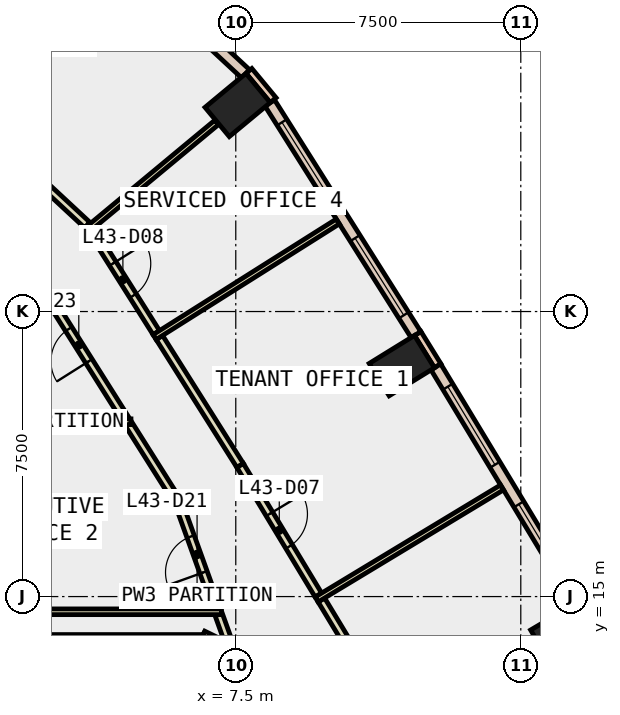
"""IFC4 building model, lengths in metres.
Left out: names, types, materials, properties, quantities, classifications, styles, units other than length and angle.
Written with IfcOpenShell. Run it as: python <this file> out.ifc"""

import sys

from ifc_helpers import new_model, si_unit, direction, frame, frame_2d, origin, origin_2d, place, context, subcontext, project, spatial, polyline, rectangle, outline, extrude, element, fill, save


model = new_model("IFC4")
c1 = context("Model", 3, precision=1e-05, world=origin(), true_north=direction((0.0, 1.0)))
c2 = subcontext(c1, "Body", "Model", "MODEL_VIEW")
j1 = project(units=[si_unit("LENGTHUNIT", "METRE"), si_unit("PLANEANGLEUNIT", "RADIAN")], contexts=[c1])
p1 = place(None, origin())
s1 = spatial("IfcSite", under=j1, at=p1, CompositionType="ELEMENT")
p2 = place(p1, origin())
s2 = spatial("IfcBuilding", under=s1, at=p2, CompositionType="ELEMENT")
p3 = place(p2, frame((0.0, 0.0, 194.0)))
s3 = spatial("IfcBuildingStorey", under=s2, at=p3, CompositionType="ELEMENT", Elevation=194.0)
for number, where, z_axis, x_axis in (
    (1, (16.116, 14.046, -0.4), (0.0, 0.0, 1.0), (-0.509, 0.861, 0.0)),
    (2, (11.869, 21.076, -0.4), (0.0, 0.0, 1.0), (-0.525, 0.851, 0.0)),
    (3, (7.549, 27.935, -0.4), (0.0, 0.0, 1.0), (-0.639, 0.769, 0.0)),
):
    element("IfcColumn", number, at=place(p3, frame(where, z_axis=z_axis, x_axis=x_axis)), inside=s3, PredefinedType="COLUMN", context=c2, shape_type="SweptSolid", body=[
        extrude(rectangle(XDim=1.0, YDim=1.4, at=origin_2d()), origin(), (0.0, 0.0, 1.0), 4.2),
    ])
p4 = place(p3, frame((0.0, 0.0, -0.4)))
e4 = element("IfcWall", 4, at=p4, inside=s3, PredefinedType="SHEAR", context=c2, shape_type="SweptSolid", body=[
    extrude(outline(polyline([(6.478, 12.88), (7.084, 13.23), (6.64, 14.0), (6.235, 13.3), (6.478, 12.88)])), origin(), (0.0, 0.0, 1.0), 4.2),
])
p5 = place(p3, frame((0.0, 0.0, -0.4)))
e5 = element("IfcWall", 5, at=p5, inside=s3, PredefinedType="SHEAR", context=c2, shape_type="SweptSolid", body=[
    extrude(outline(polyline([(6.64, 14.0), (-6.64, 14.0), (-6.235, 13.3), (6.235, 13.3), (6.64, 14.0)])), origin(), (0.0, 0.0, 1.0), 4.2),
])
p6 = place(p3, frame((12.813, 21.071, 0.0), z_axis=(0.0, 0.0, 1.0), x_axis=(-0.525648735675, 0.850701714282, 0.0)))
e6 = element("IfcWall", 6, at=p6, inside=s3, PredefinedType="STANDARD", context=c2, shape_type="SweptSolid", body=[
    extrude(rectangle(XDim=1.0, YDim=0.2, at=frame_2d((0.5, 0.0))), origin(), (0.0, 0.0, 1.0), 3.8),
])
p7 = place(p3, frame((8.484, 28.061, 0.0), z_axis=(0.0, 0.0, 1.0), x_axis=(-0.637972365578, 0.770059257953, 0.0)))
e7 = element("IfcWall", 7, at=p7, inside=s3, PredefinedType="STANDARD", context=c2, shape_type="SweptSolid", body=[
    extrude(rectangle(XDim=1.0, YDim=0.2, at=frame_2d((0.5, 0.0))), origin(), (0.0, 0.0, 1.0), 3.8),
])
p8 = place(p3, frame((16.504, 14.855, 0.0), z_axis=(0.0, 0.0, 1.0), x_axis=(-0.517159962006, 0.855888762456, 0.0)))
e8 = element("IfcWall", 8, at=p8, inside=s3, PredefinedType="STANDARD", context=c2, shape_type="SweptSolid", body=[
    extrude(rectangle(XDim=7.23, YDim=0.3, at=frame_2d((3.615, 0.0))), origin(), (0.0, 0.0, 1.0), 3.8),
])
p9 = place(p8, frame((0.607, 0.0, 0.9)))
e9 = element("IfcOpeningElement", 9, at=p9, cuts=e8, PredefinedType="OPENING", context=c2, shape_type="SweptSolid", body=[
    extrude(rectangle(XDim=2.4, YDim=2.6, at=frame_2d((1.2, 1.3))), frame((0.0, 0.16, 0.0), z_axis=(0.0, -1.0, 0.0), x_axis=(1.0, 0.0, 0.0)), (0.0, 0.0, 1.0), 0.32),
])
p10 = place(p8, frame((4.222, 0.0, 0.9)))
e10 = element("IfcOpeningElement", 10, at=p10, cuts=e8, PredefinedType="OPENING", context=c2, shape_type="SweptSolid", body=[
    extrude(rectangle(XDim=2.4, YDim=2.6, at=frame_2d((1.2, 1.3))), frame((0.0, 0.16, 0.0), z_axis=(0.0, -1.0, 0.0), x_axis=(1.0, 0.0, 0.0)), (0.0, 0.0, 1.0), 0.32),
])
p11 = place(p3, frame((12.241, 21.892, 0.0), z_axis=(0.0, 0.0, 1.0), x_axis=(-0.533680752529, 0.845686025887, 0.0)))
e11 = element("IfcWall", 11, at=p11, inside=s3, PredefinedType="STANDARD", context=c2, shape_type="SweptSolid", body=[
    extrude(rectangle(XDim=7.208, YDim=0.3, at=frame_2d((3.604, 0.0))), origin(), (0.0, 0.0, 1.0), 3.8),
])
p12 = place(p11, frame((0.602, 0.0, 0.9)))
e12 = element("IfcOpeningElement", 12, at=p12, cuts=e11, PredefinedType="OPENING", context=c2, shape_type="SweptSolid", body=[
    extrude(rectangle(XDim=2.4, YDim=2.6, at=frame_2d((1.2, 1.3))), frame((0.0, 0.16, 0.0), z_axis=(0.0, -1.0, 0.0), x_axis=(1.0, 0.0, 0.0)), (0.0, 0.0, 1.0), 0.32),
])
p13 = place(p11, frame((4.206, 0.0, 0.9)))
e13 = element("IfcOpeningElement", 13, at=p13, cuts=e11, PredefinedType="OPENING", context=c2, shape_type="SweptSolid", body=[
    extrude(rectangle(XDim=2.4, YDim=2.6, at=frame_2d((1.2, 1.3))), frame((0.0, 0.16, 0.0), z_axis=(0.0, -1.0, 0.0), x_axis=(1.0, 0.0, 0.0)), (0.0, 0.0, 1.0), 0.32),
])
p14 = place(p3, frame((7.757, 28.756, 0.0), z_axis=(0.0, 0.0, 1.0), x_axis=(-0.732897351132, 0.680339233547, 0.0)))
e14 = element("IfcWall", 14, at=p14, inside=s3, PredefinedType="STANDARD", context=c2, shape_type="SweptSolid", body=[
    extrude(rectangle(XDim=3.767, YDim=0.3, at=frame_2d((1.884, 0.0))), origin(), (0.0, 0.0, 1.0), 3.8),
])
p15 = place(p14, frame((1.184, 0.0, 0.9)))
e15 = element("IfcOpeningElement", 15, at=p15, cuts=e14, PredefinedType="OPENING", context=c2, shape_type="SweptSolid", body=[
    extrude(rectangle(XDim=1.4, YDim=2.6, at=frame_2d((0.7, 1.3))), frame((0.0, 0.16, 0.0), z_axis=(0.0, -1.0, 0.0), x_axis=(1.0, 0.0, 0.0)), (0.0, 0.0, 1.0), 0.32),
])
p16 = place(p3, frame((6.64, 14.0, 0.0), z_axis=(0.0, 0.0, 1.0), x_axis=(0.899046412443, -0.437853341055, 0.0)))
e16 = element("IfcWall", 16, at=p16, inside=s3, PredefinedType="PARTITIONING", context=c2, shape_type="SweptSolid", body=[
    extrude(rectangle(XDim=0.523, YDim=0.2, at=frame_2d((0.261, 0.0))), origin(), (0.0, 0.0, 1.0), 3.8),
])
p17 = place(p3, frame((7.401, 13.552, 0.0), z_axis=(0.0, 0.0, 1.0), x_axis=(-0.337944878606, 0.941165904091, 0.0)))
e17 = element("IfcWall", 17, at=p17, inside=s3, PredefinedType="PARTITIONING", context=c2, shape_type="SweptSolid", body=[
    extrude(rectangle(XDim=1.038, YDim=0.2, at=frame_2d((0.519, 0.0))), origin(), (0.0, 0.0, 1.0), 3.8),
])
p18 = place(p3, frame((6.999, 14.671, 0.0), z_axis=(0.0, 0.0, 1.0), x_axis=(-0.338795881304, 0.940859899672, 0.0)))
e18 = element("IfcWall", 18, at=p18, inside=s3, PredefinedType="PARTITIONING", context=c2, shape_type="SweptSolid", body=[
    extrude(rectangle(XDim=3.055, YDim=0.2, at=frame_2d((1.527, 0.0))), origin(), (0.0, 0.0, 1.0), 3.8),
])
p19 = place(p18, frame((1.027, 0.0, 0.0)))
e19 = element("IfcOpeningElement", 19, at=p19, cuts=e18, PredefinedType="OPENING", context=c2, shape_type="SweptSolid", body=[
    extrude(rectangle(XDim=1.0, YDim=2.1, at=frame_2d((0.5, 1.05))), frame((0.0, 0.11, 0.0), z_axis=(0.0, -1.0, 0.0), x_axis=(1.0, 0.0, 0.0)), (0.0, 0.0, 1.0), 0.22),
])
p20 = place(p3, frame((5.945, 17.535, 0.0), z_axis=(0.0, 0.0, 1.0), x_axis=(-0.533581643518, 0.845748561749, 0.0)))
e20 = element("IfcWall", 20, at=p20, inside=s3, PredefinedType="PARTITIONING", context=c2, shape_type="SweptSolid", body=[
    extrude(rectangle(XDim=2.367, YDim=0.2, at=frame_2d((1.184, 0.0))), origin(), (0.0, 0.0, 1.0), 3.8),
])
p21 = place(p3, frame((4.602, 19.663, 0.0), z_axis=(0.0, 0.0, 1.0), x_axis=(-0.533664968846, 0.845695986171, 0.0)))
e21 = element("IfcWall", 21, at=p21, inside=s3, PredefinedType="PARTITIONING", context=c2, shape_type="SweptSolid", body=[
    extrude(rectangle(XDim=4.621, YDim=0.2, at=frame_2d((2.311, 0.0))), origin(), (0.0, 0.0, 1.0), 3.8),
])
p22 = place(p21, frame((1.81, 0.0, 0.0)))
e22 = element("IfcOpeningElement", 22, at=p22, cuts=e21, PredefinedType="OPENING", context=c2, shape_type="SweptSolid", body=[
    extrude(rectangle(XDim=1.0, YDim=2.1, at=frame_2d((0.5, 1.05))), frame((0.0, 0.11, 0.0), z_axis=(0.0, -1.0, 0.0), x_axis=(1.0, 0.0, 0.0)), (0.0, 0.0, 1.0), 0.22),
])
p23 = place(p3, frame((9.752, 14.911, 0.0), z_axis=(0.0, 0.0, 1.0), x_axis=(0.517135291957, -0.855903668535, 0.0)))
e23 = element("IfcWall", 23, at=p23, inside=s3, PredefinedType="PARTITIONING", context=c2, shape_type="SweptSolid", body=[
    extrude(rectangle(XDim=3.982, YDim=0.2, at=frame_2d((1.991, 0.0))), origin(), (0.0, 0.0, 1.0), 3.8),
])
p24 = place(p3, frame((5.489, 21.817, 0.0), z_axis=(0.0, 0.0, 1.0), x_axis=(0.533790022325, -0.845617059943, 0.0)))
e24 = element("IfcWall", 24, at=p24, inside=s3, PredefinedType="PARTITIONING", context=c2, shape_type="SweptSolid", body=[
    extrude(rectangle(XDim=3.983, YDim=0.2, at=frame_2d((1.991, 0.0))), origin(), (0.0, 0.0, 1.0), 3.8),
])
p25 = place(p3, frame((7.615, 18.449, 0.0), z_axis=(0.0, 0.0, 1.0), x_axis=(0.516918251554, -0.856034766356, 0.0)))
e25 = element("IfcWall", 25, at=p25, inside=s3, PredefinedType="PARTITIONING", context=c2, shape_type="SweptSolid", body=[
    extrude(rectangle(XDim=3.983, YDim=0.2, at=frame_2d((1.992, 0.0))), origin(), (0.0, 0.0, 1.0), 3.8),
])
p26 = place(p25, frame((1.492, 0.0, 0.0)))
e26 = element("IfcOpeningElement", 26, at=p26, cuts=e25, PredefinedType="OPENING", context=c2, shape_type="SweptSolid", body=[
    extrude(rectangle(XDim=1.0, YDim=2.1, at=frame_2d((0.5, 1.05))), frame((0.0, 0.11, 0.0), z_axis=(0.0, -1.0, 0.0), x_axis=(1.0, 0.0, 0.0)), (0.0, 0.0, 1.0), 0.22),
])
p27 = place(p3, frame((3.65, 24.731, 0.0), z_axis=(0.0, 0.0, 1.0), x_axis=(0.533756056831, -0.845638499476, 0.0)))
e27 = element("IfcWall", 27, at=p27, inside=s3, PredefinedType="PARTITIONING", context=c2, shape_type="SweptSolid", body=[
    extrude(rectangle(XDim=3.296, YDim=0.2, at=frame_2d((1.648, 0.0))), origin(), (0.0, 0.0, 1.0), 3.8),
])
p28 = place(p27, frame((1.148, 0.0, 0.0)))
e28 = element("IfcOpeningElement", 28, at=p28, cuts=e27, PredefinedType="OPENING", context=c2, shape_type="SweptSolid", body=[
    extrude(rectangle(XDim=1.0, YDim=2.1, at=frame_2d((0.5, 1.05))), frame((0.0, 0.11, 0.0), z_axis=(0.0, -1.0, 0.0), x_axis=(1.0, 0.0, 0.0)), (0.0, 0.0, 1.0), 0.22),
])
p29 = place(p3, frame((1.707, 26.526, 0.0), z_axis=(0.0, 0.0, 1.0), x_axis=(0.732939008525, -0.680294355248, 0.0)))
e29 = element("IfcWall", 29, at=p29, inside=s3, PredefinedType="PARTITIONING", context=c2, shape_type="SweptSolid", body=[
    extrude(rectangle(XDim=2.569, YDim=0.2, at=frame_2d((1.285, 0.0))), origin(), (0.0, 0.0, 1.0), 3.8),
])
p30 = place(p3, frame((7.124, 14.6, 0.0), z_axis=(0.0, 0.0, 1.0), x_axis=(-1.0, 0.0, 0.0)))
e30 = element("IfcWall", 30, at=p30, inside=s3, PredefinedType="PARTITIONING", context=c2, shape_type="SweptSolid", body=[
    extrude(rectangle(XDim=6.724, YDim=0.15, at=frame_2d((3.362, 0.0))), origin(), (0.0, 0.0, 1.0), 3.8),
])
p31 = place(p3, frame((0.4, 19.6, 0.0), z_axis=(0.0, 0.0, 1.0), x_axis=(1.0, 0.0, 0.0)))
e31 = element("IfcWall", 31, at=p31, inside=s3, PredefinedType="PARTITIONING", context=c2, shape_type="SweptSolid", body=[
    extrude(rectangle(XDim=4.342, YDim=0.15, at=frame_2d((2.171, 0.0))), origin(), (0.0, 0.0, 1.0), 3.8),
])
p32 = place(p3, frame((9.628, 14.924, 0.0), z_axis=(0.0, 0.0, 1.0), x_axis=(0.855931736607, 0.517088834021, 0.0)))
e32 = element("IfcWall", 32, at=p32, inside=s3, PredefinedType="PARTITIONING", context=c2, shape_type="SweptSolid", body=[
    extrude(rectangle(XDim=5.699, YDim=0.15, at=frame_2d((2.85, 0.0))), origin(), (0.0, 0.0, 1.0), 3.8),
])
p33 = place(p3, frame((5.364, 21.827, 0.0), z_axis=(0.0, 0.0, 1.0), x_axis=(0.845716787596, 0.533632003517, 0.0)))
e33 = element("IfcWall", 33, at=p33, inside=s3, PredefinedType="PARTITIONING", context=c2, shape_type="SweptSolid", body=[
    extrude(rectangle(XDim=5.7, YDim=0.15, at=frame_2d((2.85, 0.0))), origin(), (0.0, 0.0, 1.0), 3.8),
])
p34 = place(p3, frame((3.586, 24.646, 0.0), z_axis=(0.0, 0.0, 1.0), x_axis=(0.769538645463, 0.638600245176, 0.0)))
e34 = element("IfcWall", 34, at=p34, inside=s3, PredefinedType="PARTITIONING", context=c2, shape_type="SweptSolid", body=[
    extrude(rectangle(XDim=4.43, YDim=0.15, at=frame_2d((2.215, 0.0))), origin(), (0.0, 0.0, 1.0), 3.8),
])
p35 = place(p9, origin())
e35 = element("IfcWindow", 35, at=p35, inside=s3, PartitioningType="SINGLE_PANEL", PredefinedType="WINDOW", context=c2, shape_type="SweptSolid", body=[
    extrude(rectangle(XDim=2.4, YDim=2.6, at=frame_2d((1.2, 1.3))), frame((0.0, 0.03, 0.0), z_axis=(0.0, -1.0, 0.0), x_axis=(1.0, 0.0, 0.0)), (0.0, 0.0, 1.0), 0.06),
])
fill(e9, e35)
p36 = place(p10, origin())
e36 = element("IfcWindow", 36, at=p36, inside=s3, PartitioningType="SINGLE_PANEL", PredefinedType="WINDOW", context=c2, shape_type="SweptSolid", body=[
    extrude(rectangle(XDim=2.4, YDim=2.6, at=frame_2d((1.2, 1.3))), frame((0.0, 0.03, 0.0), z_axis=(0.0, -1.0, 0.0), x_axis=(1.0, 0.0, 0.0)), (0.0, 0.0, 1.0), 0.06),
])
fill(e10, e36)
p37 = place(p12, origin())
e37 = element("IfcWindow", 37, at=p37, inside=s3, PartitioningType="SINGLE_PANEL", PredefinedType="WINDOW", context=c2, shape_type="SweptSolid", body=[
    extrude(rectangle(XDim=2.4, YDim=2.6, at=frame_2d((1.2, 1.3))), frame((0.0, 0.03, 0.0), z_axis=(0.0, -1.0, 0.0), x_axis=(1.0, 0.0, 0.0)), (0.0, 0.0, 1.0), 0.06),
])
fill(e12, e37)
p38 = place(p13, origin())
e38 = element("IfcWindow", 38, at=p38, inside=s3, PartitioningType="SINGLE_PANEL", PredefinedType="WINDOW", context=c2, shape_type="SweptSolid", body=[
    extrude(rectangle(XDim=2.4, YDim=2.6, at=frame_2d((1.2, 1.3))), frame((0.0, 0.03, 0.0), z_axis=(0.0, -1.0, 0.0), x_axis=(1.0, 0.0, 0.0)), (0.0, 0.0, 1.0), 0.06),
])
fill(e13, e38)
p39 = place(p26, origin())
e39 = element("IfcDoor", 39, at=p39, inside=s3, OperationType="SINGLE_SWING_LEFT", PredefinedType="DOOR", context=c2, shape_type="SweptSolid", body=[
    extrude(rectangle(XDim=1.0, YDim=2.1, at=frame_2d((0.5, 1.05))), frame((0.0, 0.025, 0.0), z_axis=(0.0, -1.0, 0.0), x_axis=(1.0, 0.0, 0.0)), (0.0, 0.0, 1.0), 0.05),
])
fill(e26, e39)
p40 = place(p28, origin())
e40 = element("IfcDoor", 40, at=p40, inside=s3, OperationType="SINGLE_SWING_LEFT", PredefinedType="DOOR", context=c2, shape_type="SweptSolid", body=[
    extrude(rectangle(XDim=1.0, YDim=2.1, at=frame_2d((0.5, 1.05))), frame((0.0, 0.025, 0.0), z_axis=(0.0, -1.0, 0.0), x_axis=(1.0, 0.0, 0.0)), (0.0, 0.0, 1.0), 0.05),
])
fill(e28, e40)
p41 = place(p19, origin())
e41 = element("IfcDoor", 41, at=p41, inside=s3, OperationType="SINGLE_SWING_LEFT", PredefinedType="DOOR", context=c2, shape_type="SweptSolid", body=[
    extrude(rectangle(XDim=1.0, YDim=2.1, at=frame_2d((0.5, 1.05))), frame((0.0, 0.025, 0.0), z_axis=(0.0, -1.0, 0.0), x_axis=(1.0, 0.0, 0.0)), (0.0, 0.0, 1.0), 0.05),
])
fill(e19, e41)
p42 = place(p22, origin())
e42 = element("IfcDoor", 42, at=p42, inside=s3, OperationType="SINGLE_SWING_LEFT", PredefinedType="DOOR", context=c2, shape_type="SweptSolid", body=[
    extrude(rectangle(XDim=1.0, YDim=2.1, at=frame_2d((0.5, 1.05))), frame((0.0, 0.025, 0.0), z_axis=(0.0, -1.0, 0.0), x_axis=(1.0, 0.0, 0.0)), (0.0, 0.0, 1.0), 0.05),
])
fill(e22, e42)
save(model, sys.argv[1])
